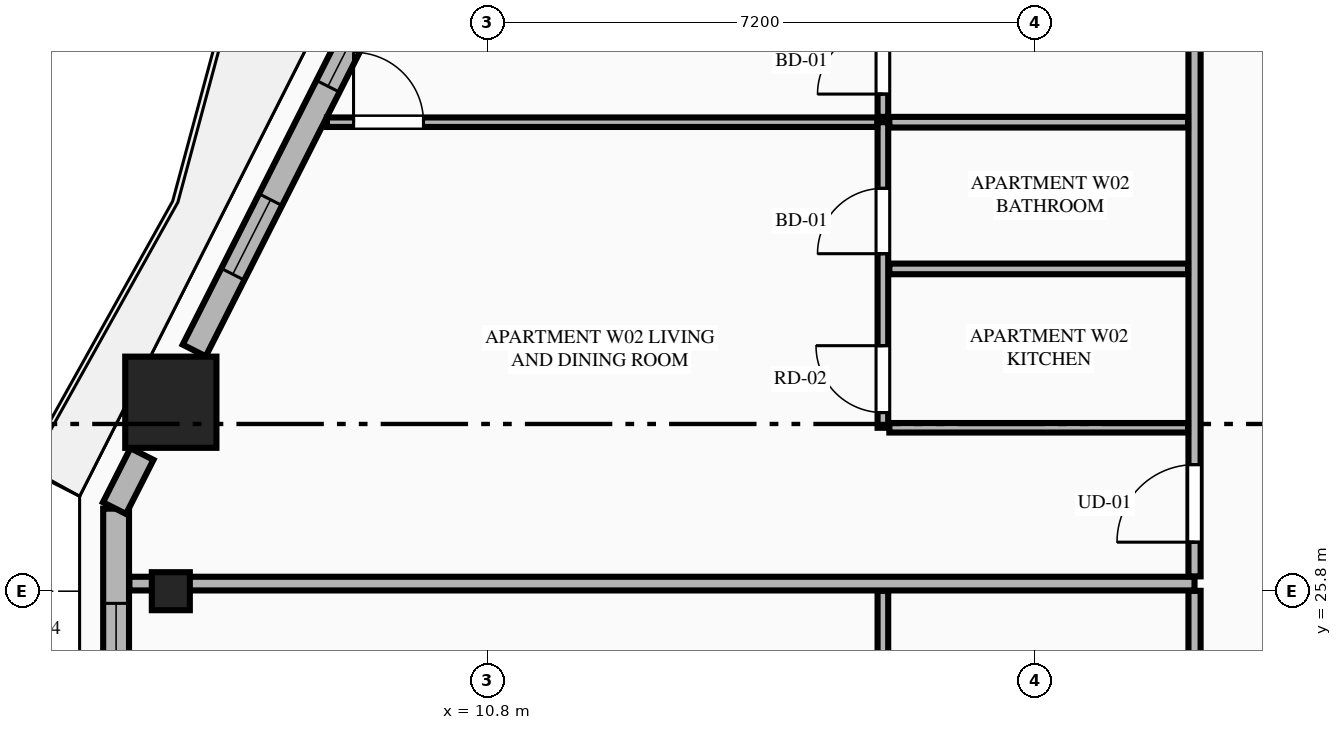
"""IFC4 building model, lengths in metres.
Left out: names, types, materials, properties, quantities, classifications, styles, units other than length and angle.
Written with IfcOpenShell. Run it as: python <this file> out.ifc"""

import sys

from ifc_helpers import new_model, si_unit, direction, frame, frame_2d, origin, origin_2d, place, context, subcontext, project, spatial, rectangle, extrude, element, fill, save


model = new_model("IFC4")
c1 = context("Model", 3, precision=1e-05, world=origin(), true_north=direction((0.0, 1.0)))
c2 = subcontext(c1, "Body", "Model", "MODEL_VIEW")
j1 = project(units=[si_unit("LENGTHUNIT", "METRE"), si_unit("PLANEANGLEUNIT", "RADIAN")], contexts=[c1])
p1 = place(None, origin())
s1 = spatial("IfcSite", under=j1, at=p1, CompositionType="ELEMENT")
p2 = place(p1, origin())
s2 = spatial("IfcBuilding", under=s1, at=p2, CompositionType="ELEMENT")
p3 = place(p2, frame((0.0, 0.0, 32.0)))
s3 = spatial("IfcBuildingStorey", under=s2, at=p3, CompositionType="ELEMENT", Elevation=32.0)
p4 = place(p3, frame((6.632, 28.286, 0.0), z_axis=(0.0, 0.0, 1.0), x_axis=(1.0, 0.0, 0.0)))
e1 = element("IfcColumn", 1, at=p4, inside=s3, PredefinedType="COLUMN", context=c2, shape_type="SweptSolid", body=[
    extrude(rectangle(XDim=1.2, YDim=1.2, at=origin_2d()), origin(), (0.0, 0.0, 1.0), 3.55),
])
p5 = place(p3, frame((6.632, 25.8, 0.0), z_axis=(0.0, 0.0, 1.0), x_axis=(0.0, -1.0, 0.0)))
e2 = element("IfcColumn", 2, at=p5, inside=s3, PredefinedType="PILASTER", context=c2, shape_type="SweptSolid", body=[
    extrude(rectangle(XDim=0.5, YDim=0.35, at=origin_2d()), origin(), (0.0, 0.0, 1.0), 3.55),
])
p6 = place(p3, frame((5.912, 26.886, 0.0), z_axis=(0.0, 0.0, 1.0), x_axis=(0.0, -1.0, 0.0)))
e3 = element("IfcWall", 3, at=p6, inside=s3, PredefinedType="STANDARD", context=c2, shape_type="SweptSolid", body=[
    extrude(rectangle(XDim=2.172, YDim=0.34, at=frame_2d((1.086, 0.0))), origin(), (0.0, 0.0, 1.0), 3.33),
])
p7 = place(p6, frame((1.246, 0.0, 0.75)))
e4 = element("IfcOpeningElement", 4, at=p7, cuts=e3, PredefinedType="OPENING", context=c2, shape_type="SweptSolid", body=[
    extrude(rectangle(XDim=0.686, YDim=2.0, at=frame_2d((0.343, 1.0))), frame((0.0, 0.18, 0.0), z_axis=(0.0, -1.0, 0.0), x_axis=(1.0, 0.0, 0.0)), (0.0, 0.0, 1.0), 0.36),
])
p8 = place(p3, frame((9.335, 33.699, 0.0), z_axis=(0.0, 0.0, 1.0), x_axis=(-0.451590635984, -0.892225250422, 0.0)))
e5 = element("IfcWall", 5, at=p8, inside=s3, PredefinedType="STANDARD", context=c2, shape_type="SweptSolid", body=[
    extrude(rectangle(XDim=5.303, YDim=0.34, at=frame_2d((2.652, 0.0))), origin(), (0.0, 0.0, 1.0), 2.787),
])
p9 = place(p8, frame((0.308, 0.0, 0.75)))
e6 = element("IfcOpeningElement", 6, at=p9, cuts=e5, PredefinedType="OPENING", context=c2, shape_type="SweptSolid", body=[
    extrude(rectangle(XDim=1.1, YDim=1.887, at=frame_2d((0.55, 0.943))), frame((0.0, 0.18, 0.0), z_axis=(0.0, -1.0, 0.0), x_axis=(1.0, 0.0, 0.0)), (0.0, 0.0, 1.0), 0.36),
])
p10 = place(p8, frame((3.08, 0.0, 0.75)))
e7 = element("IfcOpeningElement", 7, at=p10, cuts=e5, PredefinedType="OPENING", context=c2, shape_type="SweptSolid", body=[
    extrude(rectangle(XDim=1.1, YDim=1.887, at=frame_2d((0.55, 0.943))), frame((0.0, 0.18, 0.0), z_axis=(0.0, -1.0, 0.0), x_axis=(1.0, 0.0, 0.0)), (0.0, 0.0, 1.0), 0.36),
])
p11 = place(p3, frame((6.252, 27.605, 0.0), z_axis=(0.0, 0.0, 1.0), x_axis=(-0.452101093511, -0.891966704113, 0.0)))
e8 = element("IfcWall", 8, at=p11, inside=s3, PredefinedType="STANDARD", context=c2, shape_type="SweptSolid", body=[
    extrude(rectangle(XDim=0.798, YDim=0.34, at=frame_2d((0.399, 0.0))), origin(), (0.0, 0.0, 1.0), 3.33),
])
p12 = place(p3, frame((20.1, 16.045, 0.0), z_axis=(0.0, 0.0, 1.0), x_axis=(0.0, 1.0, 0.0)))
e9 = element("IfcWall", 9, at=p12, inside=s3, PredefinedType="PARTITIONING", context=c2, shape_type="SweptSolid", body=[
    extrude(rectangle(XDim=9.76, YDim=0.16, at=frame_2d((4.88, 0.0))), origin(), (0.0, 0.0, 1.0), 3.33),
])
p13 = place(p12, frame((0.45, 0.0, 0.0)))
e10 = element("IfcOpeningElement", 10, at=p13, cuts=e9, PredefinedType="OPENING", context=c2, shape_type="SweptSolid", body=[
    extrude(rectangle(XDim=1.02, YDim=2.25, at=frame_2d((0.51, 1.125))), frame((0.0, 0.09, 0.0), z_axis=(0.0, -1.0, 0.0), x_axis=(1.0, 0.0, 0.0)), (0.0, 0.0, 1.0), 0.18),
])
p14 = place(p3, frame((16.0, 22.12, 0.0), z_axis=(0.0, 0.0, 1.0), x_axis=(0.0, 1.0, 0.0)))
e11 = element("IfcWall", 11, at=p14, inside=s3, PredefinedType="PLUMBINGWALL", context=c2, shape_type="SweptSolid", body=[
    extrude(rectangle(XDim=3.685, YDim=0.14, at=frame_2d((1.842, 0.0))), origin(), (0.0, 0.0, 1.0), 3.33),
])
p15 = place(p14, frame((0.3, 0.0, 0.0)))
e12 = element("IfcOpeningElement", 12, at=p15, cuts=e11, PredefinedType="OPENING", context=c2, shape_type="SweptSolid", body=[
    extrude(rectangle(XDim=0.86, YDim=2.1, at=frame_2d((0.43, 1.05))), frame((0.0, 0.08, 0.0), z_axis=(0.0, -1.0, 0.0), x_axis=(1.0, 0.0, 0.0)), (0.0, 0.0, 1.0), 0.16),
])
p16 = place(p3, frame((6.087, 25.9, 0.0), z_axis=(0.0, 0.0, 1.0), x_axis=(1.0, 0.0, 0.0)))
e13 = element("IfcWall", 13, at=p16, inside=s3, PredefinedType="PARTITIONING", context=c2, shape_type="SweptSolid", body=[
    extrude(rectangle(XDim=14.013, YDim=0.18, at=frame_2d((7.007, 0.0))), origin(), (0.0, 0.0, 1.0), 3.33),
])
p17 = place(p3, frame((20.1, 25.995, 0.0), z_axis=(0.0, 0.0, 1.0), x_axis=(0.0, 1.0, 0.0)))
e14 = element("IfcWall", 14, at=p17, inside=s3, PredefinedType="PARTITIONING", context=c2, shape_type="SweptSolid", body=[
    extrude(rectangle(XDim=9.76, YDim=0.16, at=frame_2d((4.88, 0.0))), origin(), (0.0, 0.0, 1.0), 3.33),
])
p18 = place(p17, frame((0.45, 0.0, 0.0)))
e15 = element("IfcOpeningElement", 15, at=p18, cuts=e14, PredefinedType="OPENING", context=c2, shape_type="SweptSolid", body=[
    extrude(rectangle(XDim=1.02, YDim=2.25, at=frame_2d((0.51, 1.125))), frame((0.0, 0.09, 0.0), z_axis=(0.0, -1.0, 0.0), x_axis=(1.0, 0.0, 0.0)), (0.0, 0.0, 1.0), 0.18),
])
p19 = place(p3, frame((16.085, 27.95, 0.0), z_axis=(0.0, 0.0, 1.0), x_axis=(1.0, 0.0, 0.0)))
e16 = element("IfcWall", 16, at=p19, inside=s3, PredefinedType="PARTITIONING", context=c2, shape_type="SweptSolid", body=[
    extrude(rectangle(XDim=3.93, YDim=0.125, at=frame_2d((1.965, 0.0))), origin(), (0.0, 0.0, 1.0), 3.33),
])
p20 = place(p3, frame((16.0, 27.95, 0.0), z_axis=(0.0, 0.0, 1.0), x_axis=(0.0, 1.0, 0.0)))
e17 = element("IfcWall", 17, at=p20, inside=s3, PredefinedType="PLUMBINGWALL", context=c2, shape_type="SweptSolid", body=[
    extrude(rectangle(XDim=4.02, YDim=0.14, at=frame_2d((2.01, 0.0))), origin(), (0.0, 0.0, 1.0), 3.33),
])
p21 = place(p20, frame((0.2, 0.0, 0.0)))
e18 = element("IfcOpeningElement", 18, at=p21, cuts=e17, PredefinedType="OPENING", context=c2, shape_type="SweptSolid", body=[
    extrude(rectangle(XDim=0.88, YDim=2.15, at=frame_2d((0.44, 1.075))), frame((0.0, 0.08, 0.0), z_axis=(0.0, -1.0, 0.0), x_axis=(1.0, 0.0, 0.0)), (0.0, 0.0, 1.0), 0.16),
])
p22 = place(p20, frame((2.29, 0.0, 0.0)))
e19 = element("IfcOpeningElement", 19, at=p22, cuts=e17, PredefinedType="OPENING", context=c2, shape_type="SweptSolid", body=[
    extrude(rectangle(XDim=0.86, YDim=2.1, at=frame_2d((0.43, 1.05))), frame((0.0, 0.08, 0.0), z_axis=(0.0, -1.0, 0.0), x_axis=(1.0, 0.0, 0.0)), (0.0, 0.0, 1.0), 0.16),
])
p23 = place(p3, frame((16.0, 32.04, 0.0), z_axis=(0.0, 0.0, 1.0), x_axis=(0.0, 1.0, 0.0)))
e20 = element("IfcWall", 20, at=p23, inside=s3, PredefinedType="PLUMBINGWALL", context=c2, shape_type="SweptSolid", body=[
    extrude(rectangle(XDim=3.715, YDim=0.14, at=frame_2d((1.857, 0.0))), origin(), (0.0, 0.0, 1.0), 3.33),
])
p24 = place(p23, frame((0.3, 0.0, 0.0)))
e21 = element("IfcOpeningElement", 21, at=p24, cuts=e20, PredefinedType="OPENING", context=c2, shape_type="SweptSolid", body=[
    extrude(rectangle(XDim=0.86, YDim=2.1, at=frame_2d((0.43, 1.05))), frame((0.0, 0.08, 0.0), z_axis=(0.0, -1.0, 0.0), x_axis=(1.0, 0.0, 0.0)), (0.0, 0.0, 1.0), 0.16),
])
p25 = place(p3, frame((16.085, 31.97, 0.0), z_axis=(0.0, 0.0, 1.0), x_axis=(1.0, 0.0, 0.0)))
e22 = element("IfcWall", 22, at=p25, inside=s3, PredefinedType="PLUMBINGWALL", context=c2, shape_type="SweptSolid", body=[
    extrude(rectangle(XDim=3.93, YDim=0.14, at=frame_2d((1.965, 0.0))), origin(), (0.0, 0.0, 1.0), 3.33),
])
p26 = place(p3, frame((8.686, 31.97, 0.0), z_axis=(0.0, 0.0, 1.0), x_axis=(1.0, 0.0, 0.0)))
e23 = element("IfcWall", 23, at=p26, inside=s3, PredefinedType="PARTITIONING", context=c2, shape_type="SweptSolid", body=[
    extrude(rectangle(XDim=7.239, YDim=0.125, at=frame_2d((3.62, 0.0))), origin(), (0.0, 0.0, 1.0), 3.33),
])
p27 = place(p26, frame((0.35, 0.0, 0.0)))
e24 = element("IfcOpeningElement", 24, at=p27, cuts=e23, PredefinedType="OPENING", context=c2, shape_type="SweptSolid", body=[
    extrude(rectangle(XDim=0.92, YDim=2.15, at=frame_2d((0.46, 1.075))), frame((0.0, 0.073, 0.0), z_axis=(0.0, -1.0, 0.0), x_axis=(1.0, 0.0, 0.0)), (0.0, 0.0, 1.0), 0.145),
])
p28 = place(p3, frame((16.085, 30.04, 0.0), z_axis=(0.0, 0.0, 1.0), x_axis=(1.0, 0.0, 0.0)))
e25 = element("IfcWall", 25, at=p28, inside=s3, PredefinedType="PLUMBINGWALL", context=c2, shape_type="SweptSolid", body=[
    extrude(rectangle(XDim=3.93, YDim=0.14, at=frame_2d((1.965, 0.0))), origin(), (0.0, 0.0, 1.0), 3.33),
])
p29 = place(p9, origin())
e26 = element("IfcWindow", 26, at=p29, inside=s3, PartitioningType="SINGLE_PANEL", PredefinedType="WINDOW", context=c2, shape_type="SweptSolid", body=[
    extrude(rectangle(XDim=1.1, YDim=1.887, at=frame_2d((0.55, 0.943))), frame((0.0, 0.03, 0.0), z_axis=(0.0, -1.0, 0.0), x_axis=(1.0, 0.0, 0.0)), (0.0, 0.0, 1.0), 0.06),
])
fill(e6, e26)
p30 = place(p21, origin())
e27 = element("IfcDoor", 27, at=p30, inside=s3, OperationType="SINGLE_SWING_RIGHT", PredefinedType="DOOR", context=c2, shape_type="SweptSolid", body=[
    extrude(rectangle(XDim=0.88, YDim=2.15, at=frame_2d((0.44, 1.075))), frame((0.0, 0.025, 0.0), z_axis=(0.0, -1.0, 0.0), x_axis=(1.0, 0.0, 0.0)), (0.0, 0.0, 1.0), 0.05),
])
fill(e18, e27)
p31 = place(p22, origin())
e28 = element("IfcDoor", 28, at=p31, inside=s3, OperationType="SINGLE_SWING_LEFT", PredefinedType="DOOR", context=c2, shape_type="SweptSolid", body=[
    extrude(rectangle(XDim=0.86, YDim=2.1, at=frame_2d((0.43, 1.05))), frame((0.0, 0.025, 0.0), z_axis=(0.0, -1.0, 0.0), x_axis=(1.0, 0.0, 0.0)), (0.0, 0.0, 1.0), 0.05),
])
fill(e19, e28)
p32 = place(p24, origin())
e29 = element("IfcDoor", 29, at=p32, inside=s3, OperationType="SINGLE_SWING_LEFT", PredefinedType="DOOR", context=c2, shape_type="SweptSolid", body=[
    extrude(rectangle(XDim=0.86, YDim=2.1, at=frame_2d((0.43, 1.05))), frame((0.0, 0.025, 0.0), z_axis=(0.0, -1.0, 0.0), x_axis=(1.0, 0.0, 0.0)), (0.0, 0.0, 1.0), 0.05),
])
fill(e21, e29)
p33 = place(p18, origin())
e30 = element("IfcDoor", 30, at=p33, inside=s3, OperationType="SINGLE_SWING_LEFT", PredefinedType="DOOR", context=c2, shape_type="SweptSolid", body=[
    extrude(rectangle(XDim=1.02, YDim=2.25, at=frame_2d((0.51, 1.125))), frame((0.0, 0.025, 0.0), z_axis=(0.0, -1.0, 0.0), x_axis=(1.0, 0.0, 0.0)), (0.0, 0.0, 1.0), 0.05),
])
fill(e15, e30)
p34 = place(p27, origin())
e31 = element("IfcDoor", 31, at=p34, inside=s3, OperationType="SINGLE_SWING_LEFT", PredefinedType="DOOR", context=c2, shape_type="SweptSolid", body=[
    extrude(rectangle(XDim=0.92, YDim=2.15, at=frame_2d((0.46, 1.075))), frame((0.0, 0.025, 0.0), z_axis=(0.0, -1.0, 0.0), x_axis=(1.0, 0.0, 0.0)), (0.0, 0.0, 1.0), 0.05),
])
fill(e24, e31)
p35 = place(p10, origin())
e32 = element("IfcWindow", 32, at=p35, inside=s3, PartitioningType="SINGLE_PANEL", PredefinedType="WINDOW", context=c2, shape_type="SweptSolid", body=[
    extrude(rectangle(XDim=1.1, YDim=1.887, at=frame_2d((0.55, 0.943))), frame((0.0, 0.03, 0.0), z_axis=(0.0, -1.0, 0.0), x_axis=(1.0, 0.0, 0.0)), (0.0, 0.0, 1.0), 0.06),
])
fill(e7, e32)
p36 = place(p7, origin())
e33 = element("IfcWindow", 33, at=p36, inside=s3, PartitioningType="SINGLE_PANEL", PredefinedType="WINDOW", context=c2, shape_type="SweptSolid", body=[
    extrude(rectangle(XDim=0.686, YDim=2.0, at=frame_2d((0.343, 1.0))), frame((0.0, 0.03, 0.0), z_axis=(0.0, -1.0, 0.0), x_axis=(1.0, 0.0, 0.0)), (0.0, 0.0, 1.0), 0.06),
])
fill(e4, e33)
save(model, sys.argv[1])
